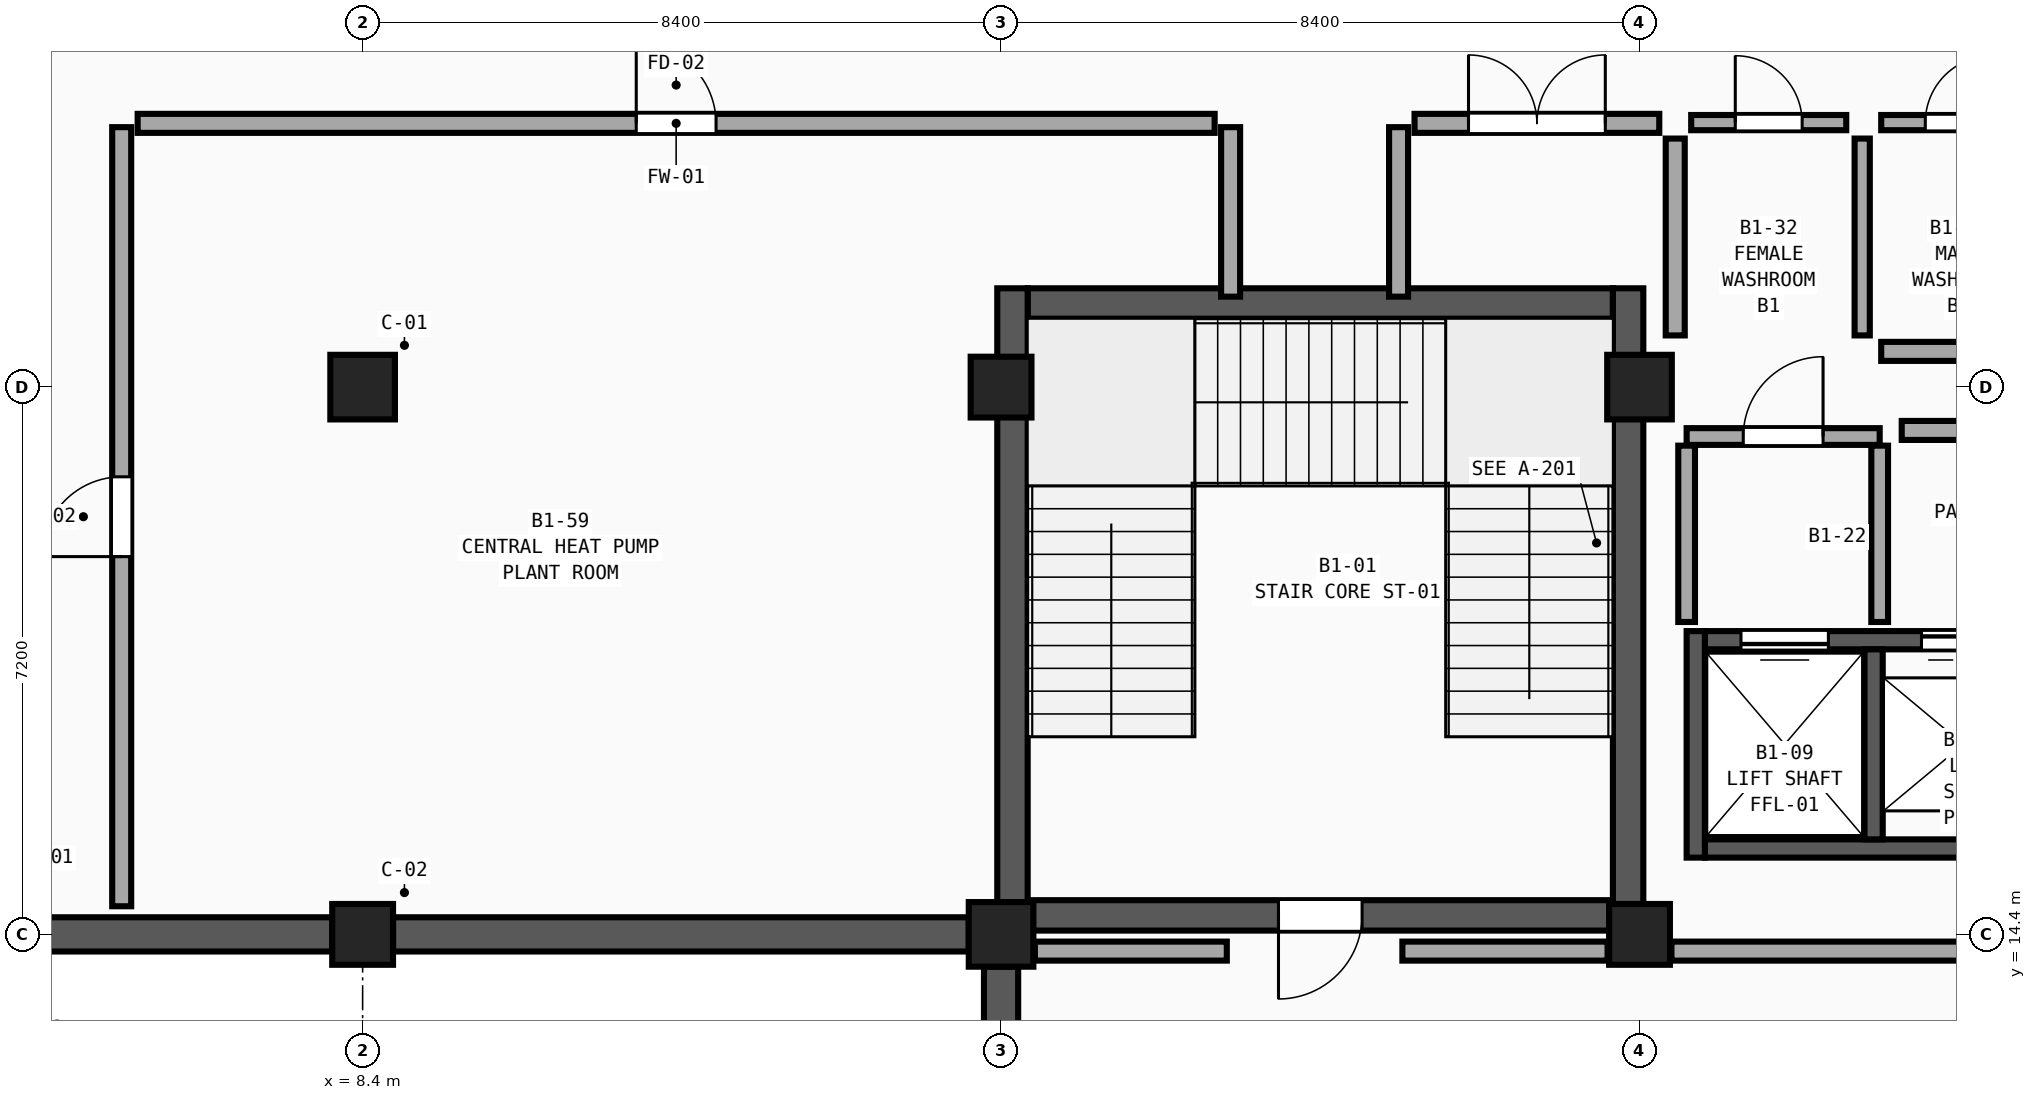
"""IFC4 building model, lengths in metres.
Left out: names, types, materials, properties, quantities, classifications, styles, units other than length and angle.
Written with IfcOpenShell. Run it as: python <this file> out.ifc"""

import sys

from ifc_helpers import new_model, si_unit, direction, frame, frame_2d, origin, origin_2d, place, context, subcontext, project, spatial, rectangle, extrude, element, fill, save


model = new_model("IFC4")
c1 = context("Model", 3, precision=1e-05, world=origin(), true_north=direction((0.0, 1.0)))
c2 = subcontext(c1, "Body", "Model", "MODEL_VIEW")
j1 = project(units=[si_unit("LENGTHUNIT", "METRE"), si_unit("PLANEANGLEUNIT", "RADIAN")], contexts=[c1])
p1 = place(None, origin())
s1 = spatial("IfcSite", under=j1, at=p1, CompositionType="ELEMENT")
p2 = place(p1, origin())
s2 = spatial("IfcBuilding", under=s1, at=p2, CompositionType="ELEMENT")
p3 = place(p2, frame((0.0, 0.0, -5.4)))
s3 = spatial("IfcBuildingStorey", under=s2, at=p3, CompositionType="ELEMENT", Elevation=-5.4)
p4 = place(p3, frame((8.4, 14.4, 0.0), z_axis=(0.0, 0.0, 1.0), x_axis=(1.0, 0.0, 0.0)))
e1 = element("IfcColumn", 1, at=p4, inside=s3, PredefinedType="COLUMN", context=c2, shape_type="SweptSolid", body=[
    extrude(rectangle(XDim=0.8, YDim=0.8, at=origin_2d()), origin(), (0.0, 0.0, 1.0), 5.4),
])
for number, where, z_axis, x_axis in (
    (2, (8.4, 21.6, 0.0), (0.0, 0.0, 1.0), (1.0, 0.0, 0.0)),
    (3, (16.8, 14.4, 0.0), (0.0, 0.0, 1.0), (1.0, 0.0, 0.0)),
):
    element("IfcColumn", number, at=place(p3, frame(where, z_axis=z_axis, x_axis=x_axis)), inside=s3, PredefinedType="COLUMN", context=c2, shape_type="SweptSolid", body=[
        extrude(rectangle(XDim=0.85, YDim=0.85, at=origin_2d()), origin(), (0.0, 0.0, 1.0), 5.4),
    ])
for number, where, z_axis, x_axis in (
    (4, (16.8, 21.6, 0.0), (0.0, 0.0, 1.0), (1.0, 0.0, 0.0)),
    (5, (25.2, 14.4, 0.0), (0.0, 0.0, 1.0), (1.0, 0.0, 0.0)),
):
    element("IfcColumn", number, at=place(p3, frame(where, z_axis=z_axis, x_axis=x_axis)), inside=s3, PredefinedType="COLUMN", context=c2, shape_type="SweptSolid", body=[
        extrude(rectangle(XDim=0.8, YDim=0.8, at=origin_2d()), origin(), (0.0, 0.0, 1.0), 5.4),
    ])
p5 = place(p3, frame((25.2, 21.6, 0.0), z_axis=(0.0, 0.0, 1.0), x_axis=(1.0, 0.0, 0.0)))
e6 = element("IfcColumn", 6, at=p5, inside=s3, PredefinedType="COLUMN", context=c2, shape_type="SweptSolid", body=[
    extrude(rectangle(XDim=0.85, YDim=0.85, at=origin_2d()), origin(), (0.0, 0.0, 1.0), 5.4),
])
for number, where, z_axis, x_axis in (
    (7, (8.0, 14.4, 0.0), (0.0, 0.0, 1.0), (-1.0, 0.0, 0.0)),
    (8, (16.375, 14.4, 0.0), (0.0, 0.0, 1.0), (-1.0, 0.0, 0.0)),
):
    element("IfcWall", number, at=place(p3, frame(where, z_axis=z_axis, x_axis=x_axis)), inside=s3, PredefinedType="USERDEFINED", context=c2, shape_type="SweptSolid", body=[
        extrude(rectangle(XDim=7.575, YDim=0.45, at=frame_2d((3.788, 0.0))), origin(), (0.0, 0.0, 1.0), 4.5),
    ])
p6 = place(p3, frame((16.8, 7.6, 0.0), z_axis=(0.0, 0.0, 1.0), x_axis=(0.0, 1.0, 0.0)))
e9 = element("IfcWall", 9, at=p6, inside=s3, PredefinedType="USERDEFINED", context=c2, shape_type="SweptSolid", body=[
    extrude(rectangle(XDim=6.375, YDim=0.45, at=frame_2d((3.188, 0.0))), origin(), (0.0, 0.0, 1.0), 4.5),
])
p7 = place(p3, frame((24.85, 14.65, 0.0), z_axis=(0.0, 0.0, 1.0), x_axis=(-1.0, 0.0, 0.0)))
e10 = element("IfcWall", 10, at=p7, inside=s3, PredefinedType="SHEAR", context=c2, shape_type="SweptSolid", body=[
    extrude(rectangle(XDim=7.7, YDim=0.4, at=frame_2d((3.85, 0.0))), origin(), (0.0, 0.0, 1.0), 5.4),
])
p8 = place(p7, frame((3.3, 0.0, 0.0)))
e11 = element("IfcOpeningElement", 11, at=p8, cuts=e10, PredefinedType="OPENING", context=c2, shape_type="SweptSolid", body=[
    extrude(rectangle(XDim=1.1, YDim=2.2, at=frame_2d((0.55, 1.1))), frame((0.0, 0.22, 0.0), z_axis=(0.0, -1.0, 0.0), x_axis=(1.0, 0.0, 0.0)), (0.0, 0.0, 1.0), 0.44),
])
p9 = place(p3, frame((17.15, 22.7, 0.0), z_axis=(0.0, 0.0, 1.0), x_axis=(1.0, 0.0, 0.0)))
e12 = element("IfcWall", 12, at=p9, inside=s3, PredefinedType="SHEAR", context=c2, shape_type="SweptSolid", body=[
    extrude(rectangle(XDim=7.7, YDim=0.4, at=frame_2d((3.85, 0.0))), origin(), (0.0, 0.0, 1.0), 5.4),
])
for number, where, z_axis, x_axis in (
    (13, (16.95, 22.9, 0.0), (0.0, 0.0, 1.0), (0.0, -1.0, 0.0)),
    (14, (25.05, 14.45, 0.0), (0.0, 0.0, 1.0), (0.0, 1.0, 0.0)),
):
    element("IfcWall", number, at=place(p3, frame(where, z_axis=z_axis, x_axis=x_axis)), inside=s3, PredefinedType="SHEAR", context=c2, shape_type="SweptSolid", body=[
        extrude(rectangle(XDim=8.45, YDim=0.4, at=frame_2d((4.225, 0.0))), origin(), (0.0, 0.0, 1.0), 5.4),
    ])
p10 = place(p3, frame((32.88, 18.27, 0.0), z_axis=(0.0, 0.0, 1.0), x_axis=(-1.0, 0.0, 0.0)))
e15 = element("IfcWall", 15, at=p10, inside=s3, PredefinedType="SHEAR", context=c2, shape_type="SweptSolid", body=[
    extrude(rectangle(XDim=6.82, YDim=0.24, at=frame_2d((3.41, 0.0))), origin(), (0.0, 0.0, 1.0), 5.05),
])
p11 = place(p10, frame((5.195, 0.0, 0.0)))
e16 = element("IfcOpeningElement", 16, at=p11, cuts=e15, PredefinedType="OPENING", context=c2, shape_type="SweptSolid", body=[
    extrude(rectangle(XDim=1.15, YDim=2.25, at=frame_2d((0.575, 1.125))), frame((0.0, 0.14, 0.0), z_axis=(0.0, -1.0, 0.0), x_axis=(1.0, 0.0, 0.0)), (0.0, 0.0, 1.0), 0.28),
])
p12 = place(p10, frame((2.87, 0.0, 0.0)))
e17 = element("IfcOpeningElement", 17, at=p12, cuts=e15, PredefinedType="OPENING", context=c2, shape_type="SweptSolid", body=[
    extrude(rectangle(XDim=1.1, YDim=2.2, at=frame_2d((0.55, 1.1))), frame((0.0, 0.14, 0.0), z_axis=(0.0, -1.0, 0.0), x_axis=(1.0, 0.0, 0.0)), (0.0, 0.0, 1.0), 0.28),
])
p13 = place(p10, frame((0.51, 0.0, 0.0)))
e18 = element("IfcOpeningElement", 18, at=p13, cuts=e15, PredefinedType="OPENING", context=c2, shape_type="SweptSolid", body=[
    extrude(rectangle(XDim=1.1, YDim=2.2, at=frame_2d((0.55, 1.1))), frame((0.0, 0.14, 0.0), z_axis=(0.0, -1.0, 0.0), x_axis=(1.0, 0.0, 0.0)), (0.0, 0.0, 1.0), 0.28),
])
p14 = place(p3, frame((26.06, 15.53, 0.0), z_axis=(0.0, 0.0, 1.0), x_axis=(1.0, 0.0, 0.0)))
e19 = element("IfcWall", 19, at=p14, inside=s3, PredefinedType="SHEAR", context=c2, shape_type="SweptSolid", body=[
    extrude(rectangle(XDim=6.82, YDim=0.24, at=frame_2d((3.41, 0.0))), origin(), (0.0, 0.0, 1.0), 5.05),
])
p15 = place(p3, frame((25.94, 18.39, 0.0), z_axis=(0.0, 0.0, 1.0), x_axis=(0.0, -1.0, 0.0)))
e20 = element("IfcWall", 20, at=p15, inside=s3, PredefinedType="SHEAR", context=c2, shape_type="SweptSolid", body=[
    extrude(rectangle(XDim=2.98, YDim=0.24, at=frame_2d((1.49, 0.0))), origin(), (0.0, 0.0, 1.0), 5.05),
])
p16 = place(p3, frame((28.28, 15.65, 0.0), z_axis=(0.0, 0.0, 1.0), x_axis=(0.0, 1.0, 0.0)))
e21 = element("IfcWall", 21, at=p16, inside=s3, PredefinedType="SHEAR", context=c2, shape_type="SweptSolid", body=[
    extrude(rectangle(XDim=2.5, YDim=0.24, at=frame_2d((1.25, 0.0))), origin(), (0.0, 0.0, 1.0), 5.05),
])
p17 = place(p3, frame((25.82, 20.95, 0.0), z_axis=(0.0, 0.0, 1.0), x_axis=(1.0, 0.0, 0.0)))
e22 = element("IfcWall", 22, at=p17, inside=s3, PredefinedType="SOLIDWALL", context=c2, shape_type="SweptSolid", body=[
    extrude(rectangle(XDim=2.54, YDim=0.22, at=frame_2d((1.27, 0.0))), origin(), (0.0, 0.0, 1.0), 4.55),
])
p18 = place(p17, frame((0.745, 0.0, 0.0)))
e23 = element("IfcOpeningElement", 23, at=p18, cuts=e22, PredefinedType="OPENING", context=c2, shape_type="SweptSolid", body=[
    extrude(rectangle(XDim=1.05, YDim=2.15, at=frame_2d((0.525, 1.075))), frame((0.0, 0.13, 0.0), z_axis=(0.0, -1.0, 0.0), x_axis=(1.0, 0.0, 0.0)), (0.0, 0.0, 1.0), 0.26),
])
for number, where, z_axis, x_axis in (
    (24, (25.82, 18.51, 0.0), (0.0, 0.0, 1.0), (0.0, 1.0, 0.0)),
    (25, (28.36, 18.51, 0.0), (0.0, 0.0, 1.0), (0.0, 1.0, 0.0)),
):
    element("IfcWall", number, at=place(p3, frame(where, z_axis=z_axis, x_axis=x_axis)), inside=s3, PredefinedType="SOLIDWALL", context=c2, shape_type="SweptSolid", body=[
        extrude(rectangle(XDim=2.32, YDim=0.22, at=frame_2d((1.16, 0.0))), origin(), (0.0, 0.0, 1.0), 5.05),
    ])
p19 = place(p3, frame((22.08, 14.18, 0.0), z_axis=(0.0, 0.0, 1.0), x_axis=(1.0, 0.0, 0.0)))
e26 = element("IfcWall", 26, at=p19, inside=s3, PredefinedType="SOLIDWALL", context=c2, shape_type="SweptSolid", body=[
    extrude(rectangle(XDim=2.7, YDim=0.25, at=frame_2d((1.35, 0.0))), origin(), (0.0, 0.0, 1.0), 4.55),
])
p20 = place(p3, frame((25.62, 14.18, 0.0), z_axis=(0.0, 0.0, 1.0), x_axis=(1.0, 0.0, 0.0)))
e27 = element("IfcWall", 27, at=p20, inside=s3, PredefinedType="SOLIDWALL", context=c2, shape_type="SweptSolid", body=[
    extrude(rectangle(XDim=7.535, YDim=0.25, at=frame_2d((3.768, 0.0))), origin(), (0.0, 0.0, 1.0), 4.55),
])
p21 = place(p3, frame((5.44, 25.07, 0.0), z_axis=(0.0, 0.0, 1.0), x_axis=(1.0, 0.0, 0.0)))
e28 = element("IfcWall", 28, at=p21, inside=s3, PredefinedType="SOLIDWALL", context=c2, shape_type="SweptSolid", body=[
    extrude(rectangle(XDim=14.17, YDim=0.25, at=frame_2d((7.085, 0.0))), origin(), (0.0, 0.0, 1.0), 5.05),
])
p22 = place(p21, frame((6.56, 0.0, 0.0)))
e29 = element("IfcOpeningElement", 29, at=p22, cuts=e28, PredefinedType="OPENING", context=c2, shape_type="SweptSolid", body=[
    extrude(rectangle(XDim=1.05, YDim=2.15, at=frame_2d((0.525, 1.075))), frame((0.0, 0.145, 0.0), z_axis=(0.0, -1.0, 0.0), x_axis=(1.0, 0.0, 0.0)), (0.0, 0.0, 1.0), 0.29),
])
p23 = place(p3, frame((5.23, 14.77, 0.0), z_axis=(0.0, 0.0, 1.0), x_axis=(0.0, 1.0, 0.0)))
e30 = element("IfcWall", 30, at=p23, inside=s3, PredefinedType="SOLIDWALL", context=c2, shape_type="SweptSolid", body=[
    extrude(rectangle(XDim=10.25, YDim=0.25, at=frame_2d((5.125, 0.0))), origin(), (0.0, 0.0, 1.0), 5.05),
])
p24 = place(p23, frame((4.6, 0.0, 0.0)))
e31 = element("IfcOpeningElement", 31, at=p24, cuts=e30, PredefinedType="OPENING", context=c2, shape_type="SweptSolid", body=[
    extrude(rectangle(XDim=1.05, YDim=2.15, at=frame_2d((0.525, 1.075))), frame((0.0, 0.145, 0.0), z_axis=(0.0, -1.0, 0.0), x_axis=(1.0, 0.0, 0.0)), (0.0, 0.0, 1.0), 0.29),
])
p25 = place(p3, frame((28.65, 21.03, 0.0), z_axis=(0.0, 0.0, 1.0), x_axis=(1.0, 0.0, 0.0)))
e32 = element("IfcWall", 32, at=p25, inside=s3, PredefinedType="SOLIDWALL", context=c2, shape_type="SweptSolid", body=[
    extrude(rectangle(XDim=4.34, YDim=0.25, at=frame_2d((2.17, 0.0))), origin(), (0.0, 0.0, 1.0), 4.55),
])
p26 = place(p3, frame((22.24, 25.07, 0.0), z_axis=(0.0, 0.0, 1.0), x_axis=(1.0, 0.0, 0.0)))
e33 = element("IfcWall", 33, at=p26, inside=s3, PredefinedType="SOLIDWALL", context=c2, shape_type="SweptSolid", body=[
    extrude(rectangle(XDim=3.22, YDim=0.25, at=frame_2d((1.61, 0.0))), origin(), (0.0, 0.0, 1.0), 5.05),
])
p27 = place(p26, frame((0.71, 0.0, 0.0)))
e34 = element("IfcOpeningElement", 34, at=p27, cuts=e33, PredefinedType="OPENING", context=c2, shape_type="SweptSolid", body=[
    extrude(rectangle(XDim=1.8, YDim=2.3, at=frame_2d((0.9, 1.15))), frame((0.0, 0.145, 0.0), z_axis=(0.0, -1.0, 0.0), x_axis=(1.0, 0.0, 0.0)), (0.0, 0.0, 1.0), 0.29),
])
p28 = place(p3, frame((17.245, 14.18, 0.0), z_axis=(0.0, 0.0, 1.0), x_axis=(1.0, 0.0, 0.0)))
e35 = element("IfcWall", 35, at=p28, inside=s3, PredefinedType="SOLIDWALL", context=c2, shape_type="SweptSolid", body=[
    extrude(rectangle(XDim=2.525, YDim=0.25, at=frame_2d((1.262, 0.0))), origin(), (0.0, 0.0, 1.0), 4.55),
])
for number, where, z_axis, x_axis in (
    (36, (19.82, 22.79, 0.0), (0.0, 0.0, 1.0), (0.0, 1.0, 0.0)),
    (37, (22.03, 22.79, 0.0), (0.0, 0.0, 1.0), (0.0, 1.0, 0.0)),
):
    element("IfcWall", number, at=place(p3, frame(where, z_axis=z_axis, x_axis=x_axis)), inside=s3, PredefinedType="SOLIDWALL", context=c2, shape_type="SweptSolid", body=[
        extrude(rectangle(XDim=2.23, YDim=0.25, at=frame_2d((1.115, 0.0))), origin(), (0.0, 0.0, 1.0), 5.05),
    ])
p29 = place(p3, frame((25.88, 25.08, 0.0), z_axis=(0.0, 0.0, 1.0), x_axis=(1.0, 0.0, 0.0)))
e38 = element("IfcWall", 38, at=p29, inside=s3, PredefinedType="PLUMBINGWALL", context=c2, shape_type="SweptSolid", body=[
    extrude(rectangle(XDim=2.04, YDim=0.2, at=frame_2d((1.02, 0.0))), origin(), (0.0, 0.0, 1.0), 5.05),
])
p30 = place(p29, frame((0.58, 0.0, 0.0)))
e39 = element("IfcOpeningElement", 39, at=p30, cuts=e38, PredefinedType="OPENING", context=c2, shape_type="SweptSolid", body=[
    extrude(rectangle(XDim=0.88, YDim=2.05, at=frame_2d((0.44, 1.025))), frame((0.0, 0.12, 0.0), z_axis=(0.0, -1.0, 0.0), x_axis=(1.0, 0.0, 0.0)), (0.0, 0.0, 1.0), 0.24),
])
p31 = place(p3, frame((28.38, 25.08, 0.0), z_axis=(0.0, 0.0, 1.0), x_axis=(1.0, 0.0, 0.0)))
e40 = element("IfcWall", 40, at=p31, inside=s3, PredefinedType="PLUMBINGWALL", context=c2, shape_type="SweptSolid", body=[
    extrude(rectangle(XDim=2.04, YDim=0.2, at=frame_2d((1.02, 0.0))), origin(), (0.0, 0.0, 1.0), 5.05),
])
p32 = place(p31, frame((0.58, 0.0, 0.0)))
e41 = element("IfcOpeningElement", 41, at=p32, cuts=e40, PredefinedType="OPENING", context=c2, shape_type="SweptSolid", body=[
    extrude(rectangle(XDim=0.88, YDim=2.05, at=frame_2d((0.44, 1.025))), frame((0.0, 0.12, 0.0), z_axis=(0.0, -1.0, 0.0), x_axis=(1.0, 0.0, 0.0)), (0.0, 0.0, 1.0), 0.24),
])
p33 = place(p3, frame((28.13, 22.28, 0.0), z_axis=(0.0, 0.0, 1.0), x_axis=(0.0, 1.0, 0.0)))
e42 = element("IfcWall", 42, at=p33, inside=s3, PredefinedType="PLUMBINGWALL", context=c2, shape_type="SweptSolid", body=[
    extrude(rectangle(XDim=2.59, YDim=0.2, at=frame_2d((1.295, 0.0))), origin(), (0.0, 0.0, 1.0), 5.05),
])
p34 = place(p3, frame((25.67, 22.28, 0.0), z_axis=(0.0, 0.0, 1.0), x_axis=(0.0, 1.0, 0.0)))
e43 = element("IfcWall", 43, at=p34, inside=s3, PredefinedType="SOLIDWALL", context=c2, shape_type="SweptSolid", body=[
    extrude(rectangle(XDim=2.59, YDim=0.25, at=frame_2d((1.295, 0.0))), origin(), (0.0, 0.0, 1.0), 5.05),
])
p35 = place(p3, frame((28.38, 22.07, 0.0), z_axis=(0.0, 0.0, 1.0), x_axis=(1.0, 0.0, 0.0)))
e44 = element("IfcWall", 44, at=p35, inside=s3, PredefinedType="SOLIDWALL", context=c2, shape_type="SweptSolid", body=[
    extrude(rectangle(XDim=2.04, YDim=0.25, at=frame_2d((1.02, 0.0))), origin(), (0.0, 0.0, 1.0), 4.55),
])
p36 = place(p8, origin())
e45 = element("IfcDoor", 45, at=p36, inside=s3, OperationType="SINGLE_SWING_RIGHT", PredefinedType="DOOR", context=c2, shape_type="SweptSolid", body=[
    extrude(rectangle(XDim=1.1, YDim=2.2, at=frame_2d((0.55, 1.1))), frame((0.0, 0.025, 0.0), z_axis=(0.0, -1.0, 0.0), x_axis=(1.0, 0.0, 0.0)), (0.0, 0.0, 1.0), 0.05),
])
fill(e11, e45)
p37 = place(p11, origin())
e46 = element("IfcDoor", 46, at=p37, inside=s3, OperationType="SLIDING_TO_LEFT", PredefinedType="DOOR", context=c2, shape_type="SweptSolid", body=[
    extrude(rectangle(XDim=1.15, YDim=2.25, at=frame_2d((0.575, 1.125))), frame((0.0, 0.025, 0.0), z_axis=(0.0, -1.0, 0.0), x_axis=(1.0, 0.0, 0.0)), (0.0, 0.0, 1.0), 0.05),
])
fill(e16, e46)
p38 = place(p12, origin())
e47 = element("IfcDoor", 47, at=p38, inside=s3, OperationType="DOUBLE_DOOR_SLIDING", PredefinedType="DOOR", context=c2, shape_type="SweptSolid", body=[
    extrude(rectangle(XDim=1.1, YDim=2.2, at=frame_2d((0.55, 1.1))), frame((0.0, 0.025, 0.0), z_axis=(0.0, -1.0, 0.0), x_axis=(1.0, 0.0, 0.0)), (0.0, 0.0, 1.0), 0.05),
])
fill(e17, e47)
p39 = place(p18, origin())
e48 = element("IfcDoor", 48, at=p39, inside=s3, OperationType="SINGLE_SWING_RIGHT", PredefinedType="DOOR", context=c2, shape_type="SweptSolid", body=[
    extrude(rectangle(XDim=1.05, YDim=2.15, at=frame_2d((0.525, 1.075))), frame((0.0, 0.025, 0.0), z_axis=(0.0, -1.0, 0.0), x_axis=(1.0, 0.0, 0.0)), (0.0, 0.0, 1.0), 0.05),
])
fill(e23, e48)
p40 = place(p22, origin())
e49 = element("IfcDoor", 49, at=p40, inside=s3, OperationType="SINGLE_SWING_LEFT", PredefinedType="DOOR", context=c2, shape_type="SweptSolid", body=[
    extrude(rectangle(XDim=1.05, YDim=2.15, at=frame_2d((0.525, 1.075))), frame((0.0, 0.025, 0.0), z_axis=(0.0, -1.0, 0.0), x_axis=(1.0, 0.0, 0.0)), (0.0, 0.0, 1.0), 0.05),
])
fill(e29, e49)
p41 = place(p24, origin())
e50 = element("IfcDoor", 50, at=p41, inside=s3, OperationType="SINGLE_SWING_LEFT", PredefinedType="DOOR", context=c2, shape_type="SweptSolid", body=[
    extrude(rectangle(XDim=1.05, YDim=2.15, at=frame_2d((0.525, 1.075))), frame((0.0, 0.025, 0.0), z_axis=(0.0, -1.0, 0.0), x_axis=(1.0, 0.0, 0.0)), (0.0, 0.0, 1.0), 0.05),
])
fill(e31, e50)
p42 = place(p27, origin())
e51 = element("IfcDoor", 51, at=p42, inside=s3, OperationType="DOUBLE_DOOR_SINGLE_SWING", PredefinedType="DOOR", context=c2, shape_type="SweptSolid", body=[
    extrude(rectangle(XDim=1.8, YDim=2.3, at=frame_2d((0.9, 1.15))), frame((0.0, 0.025, 0.0), z_axis=(0.0, -1.0, 0.0), x_axis=(1.0, 0.0, 0.0)), (0.0, 0.0, 1.0), 0.05),
])
fill(e34, e51)
p43 = place(p30, origin())
e52 = element("IfcDoor", 52, at=p43, inside=s3, OperationType="SINGLE_SWING_LEFT", PredefinedType="DOOR", context=c2, shape_type="SweptSolid", body=[
    extrude(rectangle(XDim=0.88, YDim=2.05, at=frame_2d((0.44, 1.025))), frame((0.0, 0.025, 0.0), z_axis=(0.0, -1.0, 0.0), x_axis=(1.0, 0.0, 0.0)), (0.0, 0.0, 1.0), 0.05),
])
fill(e39, e52)
p44 = place(p32, origin())
e53 = element("IfcDoor", 53, at=p44, inside=s3, OperationType="SINGLE_SWING_RIGHT", PredefinedType="DOOR", context=c2, shape_type="SweptSolid", body=[
    extrude(rectangle(XDim=0.88, YDim=2.05, at=frame_2d((0.44, 1.025))), frame((0.0, 0.025, 0.0), z_axis=(0.0, -1.0, 0.0), x_axis=(1.0, 0.0, 0.0)), (0.0, 0.0, 1.0), 0.05),
])
fill(e41, e53)
save(model, sys.argv[1])
